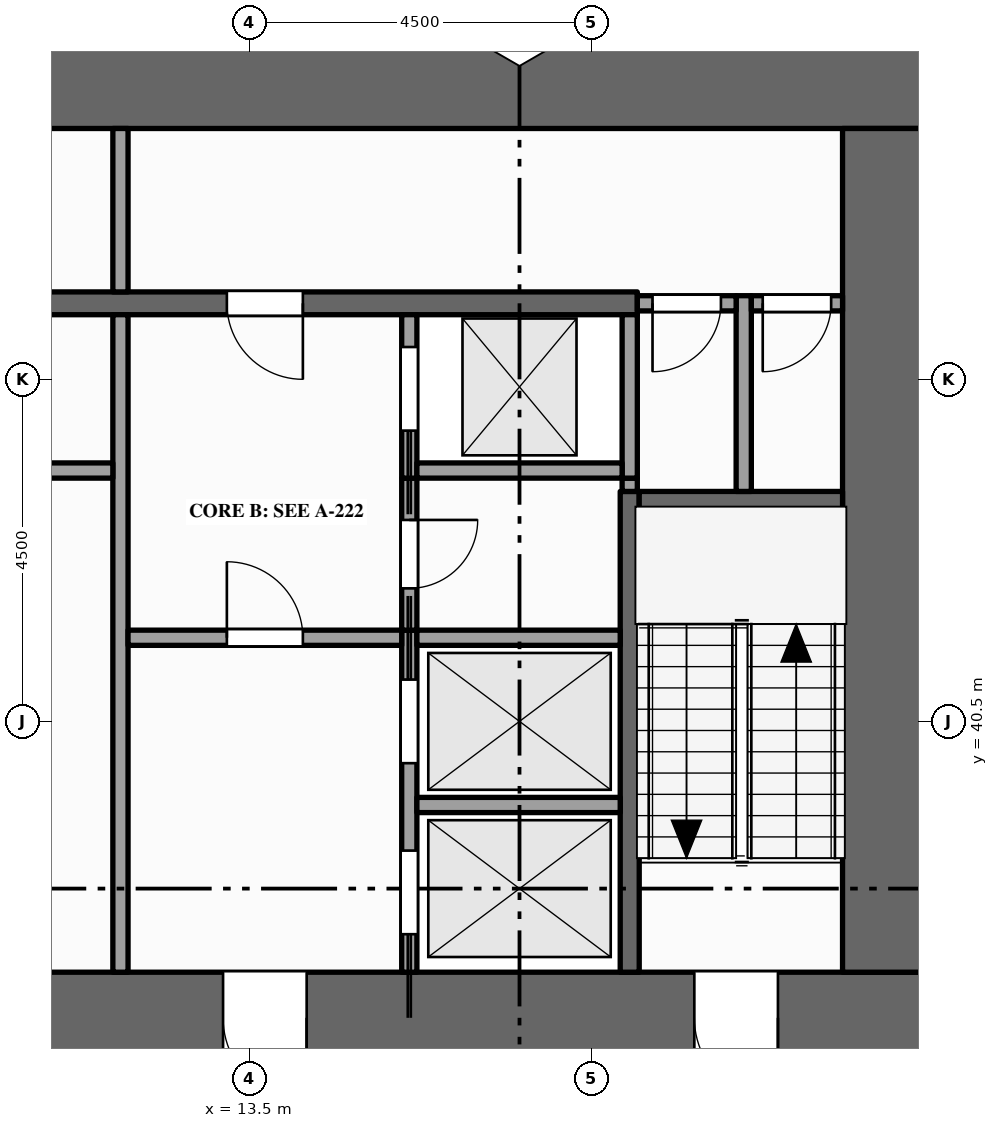
"""IFC4 building model, lengths in metres.
Left out: names, types, materials, properties, quantities, classifications, styles, units other than length and angle.
Written with IfcOpenShell. Run it as: python <this file> out.ifc"""

import sys

from ifc_helpers import new_model, si_unit, direction, frame, frame_2d, origin, place, context, subcontext, project, spatial, rectangle, extrude, element, fill, save


model = new_model("IFC4")
c1 = context("Model", 3, precision=1e-05, world=origin(), true_north=direction((0.0, 1.0)))
c2 = subcontext(c1, "Body", "Model", "MODEL_VIEW")
j1 = project(units=[si_unit("LENGTHUNIT", "METRE"), si_unit("PLANEANGLEUNIT", "RADIAN")], contexts=[c1])
p1 = place(None, origin())
s1 = spatial("IfcSite", under=j1, at=p1, CompositionType="ELEMENT")
p2 = place(p1, origin())
s2 = spatial("IfcBuilding", under=s1, at=p2, CompositionType="ELEMENT")
p3 = place(p2, frame((0.0, 0.0, 123.0)))
s3 = spatial("IfcBuildingStorey", under=s2, at=p3, CompositionType="ELEMENT", Elevation=123.0)
p4 = place(p3, frame((0.0, 36.6, -0.15), z_axis=(0.0, 0.0, 1.0), x_axis=(1.0, 0.0, 0.0)))
e1 = element("IfcWall", 1, at=p4, inside=s3, PredefinedType="SHEAR", context=c2, shape_type="SweptSolid", body=[
    extrude(rectangle(XDim=22.5, YDim=1.2, at=frame_2d((11.25, 0.0))), origin(), (0.0, 0.0, 1.0), 4.0),
])
p5 = place(p4, frame((7.1, 0.0, 0.15)))
e2 = element("IfcOpeningElement", 2, at=p5, cuts=e1, PredefinedType="OPENING", context=c2, shape_type="SweptSolid", body=[
    extrude(rectangle(XDim=1.8, YDim=2.1, at=frame_2d((0.9, 1.05))), frame((0.0, 0.61, 0.0), z_axis=(0.0, -1.0, 0.0), x_axis=(1.0, 0.0, 0.0)), (0.0, 0.0, 1.0), 1.22),
])
p6 = place(p4, frame((13.15, 0.0, 0.15)))
e3 = element("IfcOpeningElement", 3, at=p6, cuts=e1, PredefinedType="OPENING", context=c2, shape_type="SweptSolid", body=[
    extrude(rectangle(XDim=1.1, YDim=2.1, at=frame_2d((0.55, 1.05))), frame((0.0, 0.61, 0.0), z_axis=(0.0, -1.0, 0.0), x_axis=(1.0, 0.0, 0.0)), (0.0, 0.0, 1.0), 1.22),
])
p7 = place(p4, frame((2.15, 0.0, 0.15)))
e4 = element("IfcOpeningElement", 4, at=p7, cuts=e1, PredefinedType="OPENING", context=c2, shape_type="SweptSolid", body=[
    extrude(rectangle(XDim=1.1, YDim=2.1, at=frame_2d((0.55, 1.05))), frame((0.0, 0.61, 0.0), z_axis=(0.0, -1.0, 0.0), x_axis=(1.0, 0.0, 0.0)), (0.0, 0.0, 1.0), 1.22),
])
p8 = place(p4, frame((19.35, 0.0, 0.15)))
e5 = element("IfcOpeningElement", 5, at=p8, cuts=e1, PredefinedType="OPENING", context=c2, shape_type="SweptSolid", body=[
    extrude(rectangle(XDim=1.1, YDim=2.1, at=frame_2d((0.55, 1.05))), frame((0.0, 0.61, 0.0), z_axis=(0.0, -1.0, 0.0), x_axis=(1.0, 0.0, 0.0)), (0.0, 0.0, 1.0), 1.22),
])
p9 = place(p3, frame((0.0, 48.9, -0.15), z_axis=(0.0, 0.0, 1.0), x_axis=(1.0, 0.0, 0.0)))
e6 = element("IfcWall", 6, at=p9, inside=s3, PredefinedType="SHEAR", context=c2, shape_type="SweptSolid", body=[
    extrude(rectangle(XDim=22.5, YDim=1.2, at=frame_2d((11.25, 0.0))), origin(), (0.0, 0.0, 1.0), 4.0),
])
p10 = place(p3, frame((21.9, 37.2, -0.15), z_axis=(0.0, 0.0, 1.0), x_axis=(0.0, 1.0, 0.0)))
e7 = element("IfcWall", 7, at=p10, inside=s3, PredefinedType="SHEAR", context=c2, shape_type="SweptSolid", body=[
    extrude(rectangle(XDim=11.1, YDim=1.2, at=frame_2d((5.55, 0.0))), origin(), (0.0, 0.0, 1.0), 4.0),
])
p11 = place(p3, frame((11.8, 37.2, 0.0), z_axis=(0.0, 0.0, 1.0), x_axis=(0.0, 1.0, 0.0)))
e8 = element("IfcWall", 8, at=p11, inside=s3, PredefinedType="PARTITIONING", context=c2, shape_type="SweptSolid", body=[
    extrude(rectangle(XDim=8.65, YDim=0.2, at=frame_2d((4.325, 0.0))), origin(), (0.0, 0.0, 1.0), 3.85),
])
p12 = place(p3, frame((11.8, 46.15, 0.0), z_axis=(0.0, 0.0, 1.0), x_axis=(0.0, 1.0, 0.0)))
e9 = element("IfcWall", 9, at=p12, inside=s3, PredefinedType="PARTITIONING", context=c2, shape_type="SweptSolid", body=[
    extrude(rectangle(XDim=2.15, YDim=0.2, at=frame_2d((1.075, 0.0))), origin(), (0.0, 0.0, 1.0), 3.85),
])
p13 = place(p3, frame((15.6, 37.2, 0.0), z_axis=(0.0, 0.0, 1.0), x_axis=(0.0, 1.0, 0.0)))
e10 = element("IfcWall", 10, at=p13, inside=s3, PredefinedType="SOLIDWALL", context=c2, shape_type="SweptSolid", body=[
    extrude(rectangle(XDim=4.5, YDim=0.2, at=frame_2d((2.25, 0.0))), origin(), (0.0, 0.0, 1.0), 3.85),
])
p14 = place(p13, frame((0.5, 0.0, 0.012)))
e11 = element("IfcOpeningElement", 11, at=p14, cuts=e10, PredefinedType="OPENING", context=c2, shape_type="SweptSolid", body=[
    extrude(rectangle(XDim=1.1, YDim=2.1, at=frame_2d((0.55, 1.05))), frame((0.0, 0.11, 0.0), z_axis=(0.0, -1.0, 0.0), x_axis=(1.0, 0.0, 0.0)), (0.0, 0.0, 1.0), 0.22),
])
p15 = place(p13, frame((2.75, 0.0, 0.012)))
e12 = element("IfcOpeningElement", 12, at=p15, cuts=e10, PredefinedType="OPENING", context=c2, shape_type="SweptSolid", body=[
    extrude(rectangle(XDim=1.1, YDim=2.1, at=frame_2d((0.55, 1.05))), frame((0.0, 0.11, 0.0), z_axis=(0.0, -1.0, 0.0), x_axis=(1.0, 0.0, 0.0)), (0.0, 0.0, 1.0), 0.22),
])
p16 = place(p3, frame((15.6, 41.7, 0.0), z_axis=(0.0, 0.0, 1.0), x_axis=(0.0, 1.0, 0.0)))
e13 = element("IfcWall", 13, at=p16, inside=s3, PredefinedType="PARTITIONING", context=c2, shape_type="SweptSolid", body=[
    extrude(rectangle(XDim=2.0, YDim=0.2, at=frame_2d((1.0, 0.0))), origin(), (0.0, 0.0, 1.0), 3.85),
])
p17 = place(p16, frame((0.55, 0.0, 0.0)))
e14 = element("IfcOpeningElement", 14, at=p17, cuts=e13, PredefinedType="OPENING", context=c2, shape_type="SweptSolid", body=[
    extrude(rectangle(XDim=0.9, YDim=2.1, at=frame_2d((0.45, 1.05))), frame((0.0, 0.11, 0.0), z_axis=(0.0, -1.0, 0.0), x_axis=(1.0, 0.0, 0.0)), (0.0, 0.0, 1.0), 0.22),
])
p18 = place(p3, frame((15.6, 43.7, 0.0), z_axis=(0.0, 0.0, 1.0), x_axis=(0.0, 1.0, 0.0)))
e15 = element("IfcWall", 15, at=p18, inside=s3, PredefinedType="SOLIDWALL", context=c2, shape_type="SweptSolid", body=[
    extrude(rectangle(XDim=2.15, YDim=0.2, at=frame_2d((1.075, 0.0))), origin(), (0.0, 0.0, 1.0), 3.85),
])
p19 = place(p18, frame((0.625, 0.0, 0.012)))
e16 = element("IfcOpeningElement", 16, at=p19, cuts=e15, PredefinedType="OPENING", context=c2, shape_type="SweptSolid", body=[
    extrude(rectangle(XDim=1.1, YDim=2.1, at=frame_2d((0.55, 1.05))), frame((0.0, 0.11, 0.0), z_axis=(0.0, -1.0, 0.0), x_axis=(1.0, 0.0, 0.0)), (0.0, 0.0, 1.0), 0.22),
])
p20 = place(p3, frame((18.5, 37.2, 0.0), z_axis=(0.0, 0.0, 1.0), x_axis=(0.0, 1.0, 0.0)))
e17 = element("IfcWall", 17, at=p20, inside=s3, PredefinedType="SHEAR", context=c2, shape_type="SweptSolid", body=[
    extrude(rectangle(XDim=6.325, YDim=0.25, at=frame_2d((3.163, 0.0))), origin(), (0.0, 0.0, 1.0), 3.85),
])
p21 = place(p3, frame((18.5, 43.525, 0.0), z_axis=(0.0, 0.0, 1.0), x_axis=(0.0, 1.0, 0.0)))
e18 = element("IfcWall", 18, at=p21, inside=s3, PredefinedType="PARTITIONING", context=c2, shape_type="SweptSolid", body=[
    extrude(rectangle(XDim=0.175, YDim=0.2, at=frame_2d((0.087, 0.0))), origin(), (0.0, 0.0, 1.0), 3.85),
])
p22 = place(p3, frame((18.5, 43.7, 0.0), z_axis=(0.0, 0.0, 1.0), x_axis=(0.0, 1.0, 0.0)))
e19 = element("IfcWall", 19, at=p22, inside=s3, PredefinedType="SOLIDWALL", context=c2, shape_type="SweptSolid", body=[
    extrude(rectangle(XDim=2.15, YDim=0.2, at=frame_2d((1.075, 0.0))), origin(), (0.0, 0.0, 1.0), 3.85),
])
p23 = place(p3, frame((20.0, 43.525, 0.0), z_axis=(0.0, 0.0, 1.0), x_axis=(0.0, 1.0, 0.0)))
e20 = element("IfcWall", 20, at=p23, inside=s3, PredefinedType="PARTITIONING", context=c2, shape_type="SweptSolid", body=[
    extrude(rectangle(XDim=2.575, YDim=0.2, at=frame_2d((1.288, 0.0))), origin(), (0.0, 0.0, 1.0), 3.85),
])
p24 = place(p3, frame((15.7, 39.4, 0.0), z_axis=(0.0, 0.0, 1.0), x_axis=(1.0, 0.0, 0.0)))
e21 = element("IfcWall", 21, at=p24, inside=s3, PredefinedType="SOLIDWALL", context=c2, shape_type="SweptSolid", body=[
    extrude(rectangle(XDim=2.675, YDim=0.2, at=frame_2d((1.337, 0.0))), origin(), (0.0, 0.0, 1.0), 3.85),
])
p25 = place(p3, frame((11.9, 41.6, 0.0), z_axis=(0.0, 0.0, 1.0), x_axis=(1.0, 0.0, 0.0)))
e22 = element("IfcWall", 22, at=p25, inside=s3, PredefinedType="PARTITIONING", context=c2, shape_type="SweptSolid", body=[
    extrude(rectangle(XDim=3.6, YDim=0.2, at=frame_2d((1.8, 0.0))), origin(), (0.0, 0.0, 1.0), 3.85),
])
p26 = place(p25, frame((1.3, 0.0, 0.0)))
e23 = element("IfcOpeningElement", 23, at=p26, cuts=e22, PredefinedType="OPENING", context=c2, shape_type="SweptSolid", body=[
    extrude(rectangle(XDim=1.0, YDim=2.1, at=frame_2d((0.5, 1.05))), frame((0.0, 0.11, 0.0), z_axis=(0.0, -1.0, 0.0), x_axis=(1.0, 0.0, 0.0)), (0.0, 0.0, 1.0), 0.22),
])
p27 = place(p3, frame((15.7, 41.6, 0.0), z_axis=(0.0, 0.0, 1.0), x_axis=(1.0, 0.0, 0.0)))
e24 = element("IfcWall", 24, at=p27, inside=s3, PredefinedType="SOLIDWALL", context=c2, shape_type="SweptSolid", body=[
    extrude(rectangle(XDim=2.675, YDim=0.2, at=frame_2d((1.337, 0.0))), origin(), (0.0, 0.0, 1.0), 3.85),
])
p28 = place(p3, frame((18.625, 43.4, 0.0), z_axis=(0.0, 0.0, 1.0), x_axis=(1.0, 0.0, 0.0)))
e25 = element("IfcWall", 25, at=p28, inside=s3, PredefinedType="SHEAR", context=c2, shape_type="SweptSolid", body=[
    extrude(rectangle(XDim=2.675, YDim=0.25, at=frame_2d((1.337, 0.0))), origin(), (0.0, 0.0, 1.0), 3.85),
])
p29 = place(p3, frame((9.5, 43.8, 0.0), z_axis=(0.0, 0.0, 1.0), x_axis=(1.0, 0.0, 0.0)))
e26 = element("IfcWall", 26, at=p29, inside=s3, PredefinedType="PARTITIONING", context=c2, shape_type="SweptSolid", body=[
    extrude(rectangle(XDim=2.2, YDim=0.2, at=frame_2d((1.1, 0.0))), origin(), (0.0, 0.0, 1.0), 3.85),
])
p30 = place(p3, frame((15.7, 43.8, 0.0), z_axis=(0.0, 0.0, 1.0), x_axis=(1.0, 0.0, 0.0)))
e27 = element("IfcWall", 27, at=p30, inside=s3, PredefinedType="SOLIDWALL", context=c2, shape_type="SweptSolid", body=[
    extrude(rectangle(XDim=2.7, YDim=0.2, at=frame_2d((1.35, 0.0))), origin(), (0.0, 0.0, 1.0), 3.85),
])
p31 = place(p3, frame((4.1, 46.0, 0.0), z_axis=(0.0, 0.0, 1.0), x_axis=(1.0, 0.0, 0.0)))
e28 = element("IfcWall", 28, at=p31, inside=s3, PredefinedType="SHEAR", context=c2, shape_type="SweptSolid", body=[
    extrude(rectangle(XDim=14.5, YDim=0.3, at=frame_2d((7.25, 0.0))), origin(), (0.0, 0.0, 1.0), 3.85),
])
p32 = place(p31, frame((3.4, 0.0, 0.0)))
e29 = element("IfcOpeningElement", 29, at=p32, cuts=e28, PredefinedType="OPENING", context=c2, shape_type="SweptSolid", body=[
    extrude(rectangle(XDim=1.0, YDim=2.1, at=frame_2d((0.5, 1.05))), frame((0.0, 0.16, 0.0), z_axis=(0.0, -1.0, 0.0), x_axis=(1.0, 0.0, 0.0)), (0.0, 0.0, 1.0), 0.32),
])
p33 = place(p31, frame((9.1, 0.0, 0.0)))
e30 = element("IfcOpeningElement", 30, at=p33, cuts=e28, PredefinedType="OPENING", context=c2, shape_type="SweptSolid", body=[
    extrude(rectangle(XDim=1.0, YDim=2.1, at=frame_2d((0.5, 1.05))), frame((0.0, 0.16, 0.0), z_axis=(0.0, -1.0, 0.0), x_axis=(1.0, 0.0, 0.0)), (0.0, 0.0, 1.0), 0.32),
])
p34 = place(p3, frame((18.6, 46.0, 0.0), z_axis=(0.0, 0.0, 1.0), x_axis=(1.0, 0.0, 0.0)))
e31 = element("IfcWall", 31, at=p34, inside=s3, PredefinedType="PARTITIONING", context=c2, shape_type="SweptSolid", body=[
    extrude(rectangle(XDim=1.3, YDim=0.2, at=frame_2d((0.65, 0.0))), origin(), (0.0, 0.0, 1.0), 3.85),
])
p35 = place(p34, frame((0.2, 0.0, 0.0)))
e32 = element("IfcOpeningElement", 32, at=p35, cuts=e31, PredefinedType="OPENING", context=c2, shape_type="SweptSolid", body=[
    extrude(rectangle(XDim=0.9, YDim=2.1, at=frame_2d((0.45, 1.05))), frame((0.0, 0.11, 0.0), z_axis=(0.0, -1.0, 0.0), x_axis=(1.0, 0.0, 0.0)), (0.0, 0.0, 1.0), 0.22),
])
p36 = place(p3, frame((20.1, 46.0, 0.0), z_axis=(0.0, 0.0, 1.0), x_axis=(1.0, 0.0, 0.0)))
e33 = element("IfcWall", 33, at=p36, inside=s3, PredefinedType="PARTITIONING", context=c2, shape_type="SweptSolid", body=[
    extrude(rectangle(XDim=1.2, YDim=0.2, at=frame_2d((0.6, 0.0))), origin(), (0.0, 0.0, 1.0), 3.85),
])
p37 = place(p36, frame((0.15, 0.0, 0.0)))
e34 = element("IfcOpeningElement", 34, at=p37, cuts=e33, PredefinedType="OPENING", context=c2, shape_type="SweptSolid", body=[
    extrude(rectangle(XDim=0.9, YDim=2.1, at=frame_2d((0.45, 1.05))), frame((0.0, 0.11, 0.0), z_axis=(0.0, -1.0, 0.0), x_axis=(1.0, 0.0, 0.0)), (0.0, 0.0, 1.0), 0.22),
])
p38 = place(p14, origin())
e35 = element("IfcDoor", 35, at=p38, inside=s3, OperationType="SLIDING_TO_LEFT", PredefinedType="DOOR", context=c2, shape_type="SweptSolid", body=[
    extrude(rectangle(XDim=1.1, YDim=2.1, at=frame_2d((0.55, 1.05))), frame((0.0, 0.025, 0.0), z_axis=(0.0, -1.0, 0.0), x_axis=(1.0, 0.0, 0.0)), (0.0, 0.0, 1.0), 0.05),
])
fill(e11, e35)
p39 = place(p15, origin())
e36 = element("IfcDoor", 36, at=p39, inside=s3, OperationType="SLIDING_TO_RIGHT", PredefinedType="DOOR", context=c2, shape_type="SweptSolid", body=[
    extrude(rectangle(XDim=1.1, YDim=2.1, at=frame_2d((0.55, 1.05))), frame((0.0, 0.025, 0.0), z_axis=(0.0, -1.0, 0.0), x_axis=(1.0, 0.0, 0.0)), (0.0, 0.0, 1.0), 0.05),
])
fill(e12, e36)
p40 = place(p19, origin())
e37 = element("IfcDoor", 37, at=p40, inside=s3, OperationType="SLIDING_TO_LEFT", PredefinedType="DOOR", context=c2, shape_type="SweptSolid", body=[
    extrude(rectangle(XDim=1.1, YDim=2.1, at=frame_2d((0.55, 1.05))), frame((0.0, 0.025, 0.0), z_axis=(0.0, -1.0, 0.0), x_axis=(1.0, 0.0, 0.0)), (0.0, 0.0, 1.0), 0.05),
])
fill(e16, e37)
p41 = place(p6, origin())
e38 = element("IfcDoor", 38, at=p41, inside=s3, OperationType="SINGLE_SWING_RIGHT", PredefinedType="DOOR", context=c2, shape_type="SweptSolid", body=[
    extrude(rectangle(XDim=1.1, YDim=2.1, at=frame_2d((0.55, 1.05))), frame((0.0, 0.025, 0.0), z_axis=(0.0, -1.0, 0.0), x_axis=(1.0, 0.0, 0.0)), (0.0, 0.0, 1.0), 0.05),
])
fill(e3, e38)
p42 = place(p26, origin())
e39 = element("IfcDoor", 39, at=p42, inside=s3, OperationType="SINGLE_SWING_LEFT", PredefinedType="DOOR", context=c2, shape_type="SweptSolid", body=[
    extrude(rectangle(XDim=1.0, YDim=2.1, at=frame_2d((0.5, 1.05))), frame((0.0, 0.025, 0.0), z_axis=(0.0, -1.0, 0.0), x_axis=(1.0, 0.0, 0.0)), (0.0, 0.0, 1.0), 0.05),
])
fill(e23, e39)
p43 = place(p33, origin())
e40 = element("IfcDoor", 40, at=p43, inside=s3, OperationType="SINGLE_SWING_RIGHT", PredefinedType="DOOR", context=c2, shape_type="SweptSolid", body=[
    extrude(rectangle(XDim=1.0, YDim=2.1, at=frame_2d((0.5, 1.05))), frame((0.0, 0.025, 0.0), z_axis=(0.0, -1.0, 0.0), x_axis=(1.0, 0.0, 0.0)), (0.0, 0.0, 1.0), 0.05),
])
fill(e30, e40)
p44 = place(p8, origin())
e41 = element("IfcDoor", 41, at=p44, inside=s3, OperationType="SINGLE_SWING_RIGHT", PredefinedType="DOOR", context=c2, shape_type="SweptSolid", body=[
    extrude(rectangle(XDim=1.1, YDim=2.1, at=frame_2d((0.55, 1.05))), frame((0.0, 0.025, 0.0), z_axis=(0.0, -1.0, 0.0), x_axis=(1.0, 0.0, 0.0)), (0.0, 0.0, 1.0), 0.05),
])
fill(e5, e41)
p45 = place(p35, origin())
e42 = element("IfcDoor", 42, at=p45, inside=s3, OperationType="SINGLE_SWING_LEFT", PredefinedType="DOOR", context=c2, shape_type="SweptSolid", body=[
    extrude(rectangle(XDim=0.9, YDim=2.1, at=frame_2d((0.45, 1.05))), frame((0.0, 0.025, 0.0), z_axis=(0.0, -1.0, 0.0), x_axis=(1.0, 0.0, 0.0)), (0.0, 0.0, 1.0), 0.05),
])
fill(e32, e42)
p46 = place(p37, origin())
e43 = element("IfcDoor", 43, at=p46, inside=s3, OperationType="SINGLE_SWING_LEFT", PredefinedType="DOOR", context=c2, shape_type="SweptSolid", body=[
    extrude(rectangle(XDim=0.9, YDim=2.1, at=frame_2d((0.45, 1.05))), frame((0.0, 0.025, 0.0), z_axis=(0.0, -1.0, 0.0), x_axis=(1.0, 0.0, 0.0)), (0.0, 0.0, 1.0), 0.05),
])
fill(e34, e43)
p47 = place(p17, origin())
e44 = element("IfcDoor", 44, at=p47, inside=s3, OperationType="SINGLE_SWING_RIGHT", PredefinedType="DOOR", context=c2, shape_type="SweptSolid", body=[
    extrude(rectangle(XDim=0.9, YDim=2.1, at=frame_2d((0.45, 1.05))), frame((0.0, 0.025, 0.0), z_axis=(0.0, -1.0, 0.0), x_axis=(1.0, 0.0, 0.0)), (0.0, 0.0, 1.0), 0.05),
])
fill(e14, e44)
save(model, sys.argv[1])
